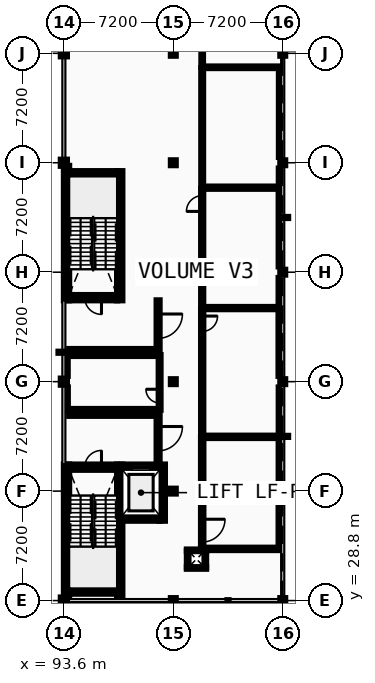
"""IFC4 building model, lengths in metres.
Left out: names, types, materials, properties, quantities, classifications, styles, units other than length and angle.
Written with IfcOpenShell. Run it as: python <this file> out.ifc"""

import sys

from ifc_helpers import new_model, si_unit, direction, frame, frame_2d, origin, origin_2d, place, context, subcontext, project, spatial, rectangle, hollow_circle, extrude, element, fill, save


model = new_model("IFC4")
c1 = context("Model", 3, precision=1e-05, world=origin(), true_north=direction((0.0, 1.0)))
c2 = subcontext(c1, "Body", "Model", "MODEL_VIEW")
j1 = project(units=[si_unit("LENGTHUNIT", "METRE"), si_unit("PLANEANGLEUNIT", "RADIAN")], contexts=[c1])
p1 = place(None, origin())
s1 = spatial("IfcSite", under=j1, at=p1, CompositionType="ELEMENT")
p2 = place(p1, origin())
s2 = spatial("IfcBuilding", under=s1, at=p2, CompositionType="ELEMENT")
p3 = place(p2, frame((0.0, 0.0, 5.2)))
s3 = spatial("IfcBuildingStorey", under=s2, at=p3, CompositionType="ELEMENT", Elevation=5.2)
for number, where, z_axis, x_axis in (
    (1, (93.6, 28.8, 0.0), (0.0, 0.0, 1.0), (1.0, 0.0, 0.0)),
    (2, (93.6, 43.2, 0.0), (0.0, 0.0, 1.0), (1.0, 0.0, 0.0)),
    (3, (93.6, 57.6, 0.0), (0.0, 0.0, 1.0), (1.0, 0.0, 0.0)),
    (4, (93.6, 64.8, 0.0), (0.0, 0.0, 1.0), (1.0, 0.0, 0.0)),
):
    element("IfcColumn", number, at=place(p3, frame(where, z_axis=z_axis, x_axis=x_axis)), inside=s3, PredefinedType="COLUMN", context=c2, shape_type="SweptSolid", body=[
        extrude(hollow_circle(Radius=0.203, WallThickness=0.016, at=origin_2d()), origin(), (0.0, 0.0, 1.0), 4.4),
    ])
for number, where, z_axis, x_axis in (
    (5, (100.8, 28.8, 0.0), (0.0, 0.0, 1.0), (1.0, 0.0, 0.0)),
    (6, (100.8, 36.0, 0.0), (0.0, 0.0, 1.0), (1.0, 0.0, 0.0)),
    (7, (100.8, 43.2, 0.0), (0.0, 0.0, 1.0), (1.0, 0.0, 0.0)),
    (8, (100.8, 50.4, 0.0), (0.0, 0.0, 1.0), (1.0, 0.0, 0.0)),
    (9, (100.8, 57.6, 0.0), (0.0, 0.0, 1.0), (1.0, 0.0, 0.0)),
    (10, (100.8, 64.8, 0.0), (0.0, 0.0, 1.0), (1.0, 0.0, 0.0)),
    (11, (108.0, 28.8, 0.0), (0.0, 0.0, 1.0), (1.0, 0.0, 0.0)),
    (12, (108.0, 36.0, 0.0), (0.0, 0.0, 1.0), (1.0, 0.0, 0.0)),
    (13, (108.0, 43.2, 0.0), (0.0, 0.0, 1.0), (1.0, 0.0, 0.0)),
    (14, (108.0, 50.4, 0.0), (0.0, 0.0, 1.0), (1.0, 0.0, 0.0)),
    (15, (108.0, 57.6, 0.0), (0.0, 0.0, 1.0), (1.0, 0.0, 0.0)),
    (16, (108.0, 64.8, 0.0), (0.0, 0.0, 1.0), (1.0, 0.0, 0.0)),
):
    element("IfcColumn", number, at=place(p3, frame(where, z_axis=z_axis, x_axis=x_axis)), inside=s3, PredefinedType="COLUMN", context=c2, shape_type="SweptSolid", body=[
        extrude(hollow_circle(Radius=0.162, WallThickness=0.012, at=origin_2d()), origin(), (0.0, 0.0, 1.0), 4.4),
    ])
p4 = place(p3, frame((93.95, 29.425, 0.0), z_axis=(0.0, 0.0, 1.0), x_axis=(1.0, 0.0, 0.0)))
e17 = element("IfcWall", 17, at=p4, inside=s3, PredefinedType="SHEAR", context=c2, shape_type="SweptSolid", body=[
    extrude(rectangle(XDim=3.15, YDim=0.35, at=frame_2d((1.575, 0.0))), origin(), (0.0, 0.0, 1.0), 4.185),
])
p5 = place(p3, frame((93.95, 37.575, 0.0), z_axis=(0.0, 0.0, 1.0), x_axis=(1.0, 0.0, 0.0)))
e18 = element("IfcWall", 18, at=p5, inside=s3, PredefinedType="SHEAR", context=c2, shape_type="SweptSolid", body=[
    extrude(rectangle(XDim=3.15, YDim=0.35, at=frame_2d((1.575, 0.0))), origin(), (0.0, 0.0, 1.0), 4.185),
])
p6 = place(p5, frame((1.025, 0.0, 0.0)))
e19 = element("IfcOpeningElement", 19, at=p6, cuts=e18, PredefinedType="OPENING", context=c2, shape_type="SweptSolid", body=[
    extrude(rectangle(XDim=1.1, YDim=2.15, at=frame_2d((0.55, 1.075))), frame((0.0, 0.185, 0.0), z_axis=(0.0, -1.0, 0.0), x_axis=(1.0, 0.0, 0.0)), (0.0, 0.0, 1.0), 0.37),
])
for number, where, z_axis, x_axis in (
    (20, (93.775, 29.0, 0.0), (0.0, 0.0, 1.0), (0.0, 1.0, 0.0)),
    (21, (97.275, 29.0, 0.0), (0.0, 0.0, 1.0), (0.0, 1.0, 0.0)),
):
    element("IfcWall", number, at=place(p3, frame(where, z_axis=z_axis, x_axis=x_axis)), inside=s3, PredefinedType="SHEAR", context=c2, shape_type="SweptSolid", body=[
        extrude(rectangle(XDim=8.75, YDim=0.35, at=frame_2d((4.375, 0.0))), origin(), (0.0, 0.0, 1.0), 4.185),
    ])
p7 = place(p3, frame((97.45, 34.225, 0.0), z_axis=(0.0, 0.0, 1.0), x_axis=(1.0, 0.0, 0.0)))
e22 = element("IfcWall", 22, at=p7, inside=s3, PredefinedType="SHEAR", context=c2, shape_type="SweptSolid", body=[
    extrude(rectangle(XDim=2.45, YDim=0.35, at=frame_2d((1.225, 0.0))), origin(), (0.0, 0.0, 1.0), 4.185),
])
p8 = place(p3, frame((97.45, 37.575, 0.0), z_axis=(0.0, 0.0, 1.0), x_axis=(1.0, 0.0, 0.0)))
e23 = element("IfcWall", 23, at=p8, inside=s3, PredefinedType="SHEAR", context=c2, shape_type="SweptSolid", body=[
    extrude(rectangle(XDim=2.45, YDim=0.35, at=frame_2d((1.225, 0.0))), origin(), (0.0, 0.0, 1.0), 4.185),
])
p9 = place(p8, frame((0.625, 0.0, 0.0)))
e24 = element("IfcOpeningElement", 24, at=p9, cuts=e23, PredefinedType="OPENING", context=c2, shape_type="SweptSolid", body=[
    extrude(rectangle(XDim=1.2, YDim=2.2, at=frame_2d((0.6, 1.1))), frame((0.0, 0.185, 0.0), z_axis=(0.0, -1.0, 0.0), x_axis=(1.0, 0.0, 0.0)), (0.0, 0.0, 1.0), 0.37),
])
p10 = place(p3, frame((100.075, 34.05, 0.0), z_axis=(0.0, 0.0, 1.0), x_axis=(0.0, 1.0, 0.0)))
e25 = element("IfcWall", 25, at=p10, inside=s3, PredefinedType="SHEAR", context=c2, shape_type="SweptSolid", body=[
    extrude(rectangle(XDim=3.7, YDim=0.35, at=frame_2d((1.85, 0.0))), origin(), (0.0, 0.0, 1.0), 4.185),
])
p11 = place(p3, frame((99.8, 37.75, 0.0), z_axis=(0.0, 0.0, 1.0), x_axis=(0.0, 1.0, 0.0)))
e26 = element("IfcWall", 26, at=p11, inside=s3, PredefinedType="PARTITIONING", context=c2, shape_type="SweptSolid", body=[
    extrude(rectangle(XDim=3.4, YDim=0.2, at=frame_2d((1.7, 0.0))), origin(), (0.0, 0.0, 1.0), 4.185),
])
p12 = place(p11, frame((0.9, 0.0, 0.0)))
e27 = element("IfcOpeningElement", 27, at=p12, cuts=e26, PredefinedType="OPENING", context=c2, shape_type="SweptSolid", body=[
    extrude(rectangle(XDim=1.6, YDim=2.2, at=frame_2d((0.8, 1.1))), frame((0.0, 0.11, 0.0), z_axis=(0.0, -1.0, 0.0), x_axis=(1.0, 0.0, 0.0)), (0.0, 0.0, 1.0), 0.22),
])
p13 = place(p3, frame((93.95, 41.05, 0.0), z_axis=(0.0, 0.0, 1.0), x_axis=(1.0, 0.0, 0.0)))
e28 = element("IfcWall", 28, at=p13, inside=s3, PredefinedType="PARTITIONING", context=c2, shape_type="SweptSolid", body=[
    extrude(rectangle(XDim=5.75, YDim=0.2, at=frame_2d((2.875, 0.0))), origin(), (0.0, 0.0, 1.0), 4.185),
])
p14 = place(p3, frame((93.95, 48.725, 0.0), z_axis=(0.0, 0.0, 1.0), x_axis=(1.0, 0.0, 0.0)))
e29 = element("IfcWall", 29, at=p14, inside=s3, PredefinedType="SHEAR", context=c2, shape_type="SweptSolid", body=[
    extrude(rectangle(XDim=3.15, YDim=0.35, at=frame_2d((1.575, 0.0))), origin(), (0.0, 0.0, 1.0), 4.185),
])
p15 = place(p14, frame((1.025, 0.0, 0.0)))
e30 = element("IfcOpeningElement", 30, at=p15, cuts=e29, PredefinedType="OPENING", context=c2, shape_type="SweptSolid", body=[
    extrude(rectangle(XDim=1.1, YDim=2.15, at=frame_2d((0.55, 1.075))), frame((0.0, 0.185, 0.0), z_axis=(0.0, -1.0, 0.0), x_axis=(1.0, 0.0, 0.0)), (0.0, 0.0, 1.0), 0.37),
])
p16 = place(p3, frame((93.95, 56.875, 0.0), z_axis=(0.0, 0.0, 1.0), x_axis=(1.0, 0.0, 0.0)))
e31 = element("IfcWall", 31, at=p16, inside=s3, PredefinedType="SHEAR", context=c2, shape_type="SweptSolid", body=[
    extrude(rectangle(XDim=3.15, YDim=0.35, at=frame_2d((1.575, 0.0))), origin(), (0.0, 0.0, 1.0), 4.185),
])
p17 = place(p3, frame((93.775, 48.55, 0.0), z_axis=(0.0, 0.0, 1.0), x_axis=(0.0, 1.0, 0.0)))
e32 = element("IfcWall", 32, at=p17, inside=s3, PredefinedType="SHEAR", context=c2, shape_type="SweptSolid", body=[
    extrude(rectangle(XDim=8.847, YDim=0.35, at=frame_2d((4.423, 0.0))), origin(), (0.0, 0.0, 1.0), 4.185),
])
p18 = place(p3, frame((97.275, 48.55, 0.0), z_axis=(0.0, 0.0, 1.0), x_axis=(0.0, 1.0, 0.0)))
e33 = element("IfcWall", 33, at=p18, inside=s3, PredefinedType="SHEAR", context=c2, shape_type="SweptSolid", body=[
    extrude(rectangle(XDim=8.5, YDim=0.35, at=frame_2d((4.25, 0.0))), origin(), (0.0, 0.0, 1.0), 4.185),
])
p19 = place(p3, frame((99.8, 45.15, 0.0), z_axis=(0.0, 0.0, 1.0), x_axis=(0.0, 1.0, 0.0)))
e34 = element("IfcWall", 34, at=p19, inside=s3, PredefinedType="PARTITIONING", context=c2, shape_type="SweptSolid", body=[
    extrude(rectangle(XDim=3.4, YDim=0.2, at=frame_2d((1.7, 0.0))), origin(), (0.0, 0.0, 1.0), 4.185),
])
p20 = place(p19, frame((0.9, 0.0, 0.0)))
e35 = element("IfcOpeningElement", 35, at=p20, cuts=e34, PredefinedType="OPENING", context=c2, shape_type="SweptSolid", body=[
    extrude(rectangle(XDim=1.6, YDim=2.2, at=frame_2d((0.8, 1.1))), frame((0.0, 0.11, 0.0), z_axis=(0.0, -1.0, 0.0), x_axis=(1.0, 0.0, 0.0)), (0.0, 0.0, 1.0), 0.22),
])
p21 = place(p3, frame((93.95, 45.25, 0.0), z_axis=(0.0, 0.0, 1.0), x_axis=(1.0, 0.0, 0.0)))
e36 = element("IfcWall", 36, at=p21, inside=s3, PredefinedType="PARTITIONING", context=c2, shape_type="SweptSolid", body=[
    extrude(rectangle(XDim=5.75, YDim=0.2, at=frame_2d((2.875, 0.0))), origin(), (0.0, 0.0, 1.0), 4.185),
])
for number, where, z_axis, x_axis in (
    (37, (101.69, 30.945, 0.0), (0.0, 0.0, 1.0), (1.0, 0.0, 0.0)),
    (38, (101.69, 32.105, 0.0), (0.0, 0.0, 1.0), (1.0, 0.0, 0.0)),
):
    element("IfcWall", number, at=place(p3, frame(where, z_axis=z_axis, x_axis=x_axis)), inside=s3, PredefinedType="PARTITIONING", context=c2, shape_type="SweptSolid", body=[
        extrude(rectangle(XDim=1.27, YDim=0.11, at=frame_2d((0.635, 0.0))), origin(), (0.0, 0.0, 1.0), 4.185),
    ])
for number, where, z_axis, x_axis in (
    (39, (101.745, 31.0, 0.0), (0.0, 0.0, 1.0), (0.0, 1.0, 0.0)),
    (40, (102.905, 31.0, 0.0), (0.0, 0.0, 1.0), (0.0, 1.0, 0.0)),
):
    element("IfcWall", number, at=place(p3, frame(where, z_axis=z_axis, x_axis=x_axis)), inside=s3, PredefinedType="PARTITIONING", context=c2, shape_type="SweptSolid", body=[
        extrude(rectangle(XDim=1.05, YDim=0.11, at=frame_2d((0.525, 0.0))), origin(), (0.0, 0.0, 1.0), 4.185),
    ])
p22 = place(p3, frame((103.035, 32.2, 0.0), z_axis=(0.0, 0.0, 1.0), x_axis=(1.0, 0.0, 0.0)))
e41 = element("IfcWall", 41, at=p22, inside=s3, PredefinedType="PARTITIONING", context=c2, shape_type="SweptSolid", body=[
    extrude(rectangle(XDim=4.765, YDim=0.16, at=frame_2d((2.383, 0.0))), origin(), (0.0, 0.0, 1.0), 4.185),
])
p23 = place(p3, frame((102.7, 39.57, 0.0), z_axis=(0.0, 0.0, 1.0), x_axis=(1.0, 0.0, 0.0)))
e42 = element("IfcWall", 42, at=p23, inside=s3, PredefinedType="PARTITIONING", context=c2, shape_type="SweptSolid", body=[
    extrude(rectangle(XDim=5.1, YDim=0.16, at=frame_2d((2.55, 0.0))), origin(), (0.0, 0.0, 1.0), 4.185),
])
p24 = place(p3, frame((93.8, 41.35, 0.0), z_axis=(0.0, 0.0, 1.0), x_axis=(1.0, 0.0, 0.0)))
e43 = element("IfcWall", 43, at=p24, inside=s3, PredefinedType="PARTITIONING", context=c2, shape_type="SweptSolid", body=[
    extrude(rectangle(XDim=5.88, YDim=0.11, at=frame_2d((2.94, 0.0))), origin(), (0.0, 0.0, 1.0), 4.185),
])
p25 = place(p3, frame((93.8, 44.95, 0.0), z_axis=(0.0, 0.0, 1.0), x_axis=(1.0, 0.0, 0.0)))
e44 = element("IfcWall", 44, at=p25, inside=s3, PredefinedType="PARTITIONING", context=c2, shape_type="SweptSolid", body=[
    extrude(rectangle(XDim=5.88, YDim=0.125, at=frame_2d((2.94, 0.0))), origin(), (0.0, 0.0, 1.0), 4.185),
])
for number, where, z_axis, x_axis in (
    (45, (102.7, 48.04, 0.0), (0.0, 0.0, 1.0), (1.0, 0.0, 0.0)),
    (46, (102.7, 55.96, 0.0), (0.0, 0.0, 1.0), (1.0, 0.0, 0.0)),
):
    element("IfcWall", number, at=place(p3, frame(where, z_axis=z_axis, x_axis=x_axis)), inside=s3, PredefinedType="PARTITIONING", context=c2, shape_type="SweptSolid", body=[
        extrude(rectangle(XDim=5.1, YDim=0.15, at=frame_2d((2.55, 0.0))), origin(), (0.0, 0.0, 1.0), 4.185),
    ])
p26 = place(p3, frame((102.7, 63.88, 0.0), z_axis=(0.0, 0.0, 1.0), x_axis=(1.0, 0.0, 0.0)))
e47 = element("IfcWall", 47, at=p26, inside=s3, PredefinedType="PARTITIONING", context=c2, shape_type="SweptSolid", body=[
    extrude(rectangle(XDim=5.1, YDim=0.11, at=frame_2d((2.55, 0.0))), origin(), (0.0, 0.0, 1.0), 4.185),
])
p27 = place(p3, frame((93.8, 41.405, 0.0), z_axis=(0.0, 0.0, 1.0), x_axis=(0.0, 1.0, 0.0)))
e48 = element("IfcWall", 48, at=p27, inside=s3, PredefinedType="PARTITIONING", context=c2, shape_type="SweptSolid", body=[
    extrude(rectangle(XDim=1.415, YDim=0.125, at=frame_2d((0.708, 0.0))), origin(), (0.0, 0.0, 1.0), 4.185),
])
p28 = place(p3, frame((93.8, 43.58, 0.0), z_axis=(0.0, 0.0, 1.0), x_axis=(0.0, 1.0, 0.0)))
e49 = element("IfcWall", 49, at=p28, inside=s3, PredefinedType="PARTITIONING", context=c2, shape_type="SweptSolid", body=[
    extrude(rectangle(XDim=1.307, YDim=0.11, at=frame_2d((0.654, 0.0))), origin(), (0.0, 0.0, 1.0), 4.185),
])
p29 = place(p3, frame((99.9, 41.35, 0.0), z_axis=(0.0, 0.0, 1.0), x_axis=(0.0, 1.0, 0.0)))
e50 = element("IfcWall", 50, at=p29, inside=s3, PredefinedType="PARTITIONING", context=c2, shape_type="SweptSolid", body=[
    extrude(rectangle(XDim=3.6, YDim=0.125, at=frame_2d((1.8, 0.0))), origin(), (0.0, 0.0, 1.0), 4.185),
])
p30 = place(p29, frame((0.45, 0.0, 0.0)))
e51 = element("IfcOpeningElement", 51, at=p30, cuts=e50, PredefinedType="OPENING", context=c2, shape_type="SweptSolid", body=[
    extrude(rectangle(XDim=0.9, YDim=2.1, at=frame_2d((0.45, 1.05))), frame((0.0, 0.073, 0.0), z_axis=(0.0, -1.0, 0.0), x_axis=(1.0, 0.0, 0.0)), (0.0, 0.0, 1.0), 0.145),
])
p31 = place(p3, frame((102.7, 32.2, 0.0), z_axis=(0.0, 0.0, 1.0), x_axis=(0.0, 1.0, 0.0)))
e52 = element("IfcWall", 52, at=p31, inside=s3, PredefinedType="PARTITIONING", context=c2, shape_type="SweptSolid", body=[
    extrude(rectangle(XDim=7.29, YDim=0.16, at=frame_2d((3.645, 0.0))), origin(), (0.0, 0.0, 1.0), 4.185),
])
p32 = place(p31, frame((0.45, 0.0, 0.0)))
e53 = element("IfcOpeningElement", 53, at=p32, cuts=e52, PredefinedType="OPENING", context=c2, shape_type="SweptSolid", body=[
    extrude(rectangle(XDim=1.5, YDim=2.2, at=frame_2d((0.75, 1.1))), frame((0.0, 0.09, 0.0), z_axis=(0.0, -1.0, 0.0), x_axis=(1.0, 0.0, 0.0)), (0.0, 0.0, 1.0), 0.18),
])
p33 = place(p3, frame((102.7, 39.65, 0.0), z_axis=(0.0, 0.0, 1.0), x_axis=(0.0, 1.0, 0.0)))
e54 = element("IfcWall", 54, at=p33, inside=s3, PredefinedType="PARTITIONING", context=c2, shape_type="SweptSolid", body=[
    extrude(rectangle(XDim=8.315, YDim=0.15, at=frame_2d((4.158, 0.0))), origin(), (0.0, 0.0, 1.0), 4.185),
])
p34 = place(p33, frame((6.855, 0.0, 0.0)))
e55 = element("IfcOpeningElement", 55, at=p34, cuts=e54, PredefinedType="OPENING", context=c2, shape_type="SweptSolid", body=[
    extrude(rectangle(XDim=1.01, YDim=2.124, at=frame_2d((0.505, 1.062))), frame((0.0, 0.085, 0.0), z_axis=(0.0, -1.0, 0.0), x_axis=(1.0, 0.0, 0.0)), (0.0, 0.0, 1.0), 0.17),
])
p35 = place(p3, frame((102.7, 48.115, 0.0), z_axis=(0.0, 0.0, 1.0), x_axis=(0.0, 1.0, 0.0)))
e56 = element("IfcWall", 56, at=p35, inside=s3, PredefinedType="PARTITIONING", context=c2, shape_type="SweptSolid", body=[
    extrude(rectangle(XDim=7.77, YDim=0.142, at=frame_2d((3.885, 0.0))), origin(), (0.0, 0.0, 1.0), 4.185),
])
p36 = place(p35, frame((6.284, 0.0, 0.0)))
e57 = element("IfcOpeningElement", 57, at=p36, cuts=e56, PredefinedType="OPENING", context=c2, shape_type="SweptSolid", body=[
    extrude(rectangle(XDim=1.036, YDim=2.124, at=frame_2d((0.518, 1.062))), frame((0.0, 0.081, 0.0), z_axis=(0.0, -1.0, 0.0), x_axis=(1.0, 0.0, 0.0)), (0.0, 0.0, 1.0), 0.162),
])
p37 = place(p3, frame((102.7, 56.035, 0.0), z_axis=(0.0, 0.0, 1.0), x_axis=(0.0, 1.0, 0.0)))
e58 = element("IfcWall", 58, at=p37, inside=s3, PredefinedType="PARTITIONING", context=c2, shape_type="SweptSolid", body=[
    extrude(rectangle(XDim=7.79, YDim=0.125, at=frame_2d((3.895, 0.0))), origin(), (0.0, 0.0, 1.0), 4.185),
])
p38 = place(p37, frame((3.395, 0.0, 0.0)))
e59 = element("IfcOpeningElement", 59, at=p38, cuts=e58, PredefinedType="OPENING", context=c2, shape_type="SweptSolid", body=[
    extrude(rectangle(XDim=1.0, YDim=2.1, at=frame_2d((0.5, 1.05))), frame((0.0, 0.073, 0.0), z_axis=(0.0, -1.0, 0.0), x_axis=(1.0, 0.0, 0.0)), (0.0, 0.0, 1.0), 0.145),
])
p39 = place(p3, frame((102.7, 63.935, 0.0), z_axis=(0.0, 0.0, 1.0), x_axis=(0.0, 1.0, 0.0)))
e60 = element("IfcWall", 60, at=p39, inside=s3, PredefinedType="PARTITIONING", context=c2, shape_type="SweptSolid", body=[
    extrude(rectangle(XDim=7.802, YDim=0.11, at=frame_2d((3.901, 0.0))), origin(), (0.0, 0.0, 1.0), 4.185),
])
p40 = place(p39, frame((3.451, 0.0, 0.0)))
e61 = element("IfcOpeningElement", 61, at=p40, cuts=e60, PredefinedType="OPENING", context=c2, shape_type="SweptSolid", body=[
    extrude(rectangle(XDim=0.9, YDim=2.1, at=frame_2d((0.45, 1.05))), frame((0.0, 0.065, 0.0), z_axis=(0.0, -1.0, 0.0), x_axis=(1.0, 0.0, 0.0)), (0.0, 0.0, 1.0), 0.13),
])
p41 = place(p3, frame((107.8, 32.28, 0.0), z_axis=(0.0, 0.0, 1.0), x_axis=(0.0, 1.0, 0.0)))
e62 = element("IfcWall", 62, at=p41, inside=s3, PredefinedType="PARTITIONING", context=c2, shape_type="SweptSolid", body=[
    extrude(rectangle(XDim=3.34, YDim=0.15, at=frame_2d((1.67, 0.0))), origin(), (0.0, 0.0, 1.0), 3.81),
])
p42 = place(p3, frame((107.8, 36.38, 0.0), z_axis=(0.0, 0.0, 1.0), x_axis=(0.0, 1.0, 0.0)))
e63 = element("IfcWall", 63, at=p42, inside=s3, PredefinedType="PARTITIONING", context=c2, shape_type="SweptSolid", body=[
    extrude(rectangle(XDim=3.11, YDim=0.142, at=frame_2d((1.555, 0.0))), origin(), (0.0, 0.0, 1.0), 3.81),
])
p43 = place(p3, frame((107.8, 39.65, 0.0), z_axis=(0.0, 0.0, 1.0), x_axis=(0.0, 1.0, 0.0)))
e64 = element("IfcWall", 64, at=p43, inside=s3, PredefinedType="PARTITIONING", context=c2, shape_type="SweptSolid", body=[
    extrude(rectangle(XDim=3.17, YDim=0.135, at=frame_2d((1.585, 0.0))), origin(), (0.0, 0.0, 1.0), 3.81),
])
p44 = place(p3, frame((107.8, 43.58, 0.0), z_axis=(0.0, 0.0, 1.0), x_axis=(0.0, 1.0, 0.0)))
e65 = element("IfcWall", 65, at=p44, inside=s3, PredefinedType="PARTITIONING", context=c2, shape_type="SweptSolid", body=[
    extrude(rectangle(XDim=4.385, YDim=0.16, at=frame_2d((2.192, 0.0))), origin(), (0.0, 0.0, 1.0), 3.81),
])
p45 = place(p3, frame((107.8, 48.115, 0.0), z_axis=(0.0, 0.0, 1.0), x_axis=(0.0, 1.0, 0.0)))
e66 = element("IfcWall", 66, at=p45, inside=s3, PredefinedType="PARTITIONING", context=c2, shape_type="SweptSolid", body=[
    extrude(rectangle(XDim=1.905, YDim=0.15, at=frame_2d((0.953, 0.0))), origin(), (0.0, 0.0, 1.0), 3.81),
])
p46 = place(p3, frame((107.8, 50.78, 0.0), z_axis=(0.0, 0.0, 1.0), x_axis=(0.0, 1.0, 0.0)))
e67 = element("IfcWall", 67, at=p46, inside=s3, PredefinedType="PARTITIONING", context=c2, shape_type="SweptSolid", body=[
    extrude(rectangle(XDim=5.105, YDim=0.142, at=frame_2d((2.552, 0.0))), origin(), (0.0, 0.0, 1.0), 3.81),
])
p47 = place(p3, frame((107.8, 56.035, 0.0), z_axis=(0.0, 0.0, 1.0), x_axis=(0.0, 1.0, 0.0)))
e68 = element("IfcWall", 68, at=p47, inside=s3, PredefinedType="PARTITIONING", context=c2, shape_type="SweptSolid", body=[
    extrude(rectangle(XDim=1.185, YDim=0.125, at=frame_2d((0.593, 0.0))), origin(), (0.0, 0.0, 1.0), 3.81),
])
p48 = place(p3, frame((107.8, 57.98, 0.0), z_axis=(0.0, 0.0, 1.0), x_axis=(0.0, 1.0, 0.0)))
e69 = element("IfcWall", 69, at=p48, inside=s3, PredefinedType="PARTITIONING", context=c2, shape_type="SweptSolid", body=[
    extrude(rectangle(XDim=5.845, YDim=0.11, at=frame_2d((2.922, 0.0))), origin(), (0.0, 0.0, 1.0), 4.185),
])
p49 = place(p6, frame((1.1, 0.0, 0.0), z_axis=(0.0, 0.0, 1.0), x_axis=(-1.0, 0.0, 0.0)))
e70 = element("IfcDoor", 70, at=p49, inside=s3, OperationType="SINGLE_SWING_RIGHT", PredefinedType="DOOR", context=c2, shape_type="SweptSolid", body=[
    extrude(rectangle(XDim=1.1, YDim=2.15, at=frame_2d((0.55, 1.075))), frame((0.0, 0.025, 0.0), z_axis=(0.0, -1.0, 0.0), x_axis=(1.0, 0.0, 0.0)), (0.0, 0.0, 1.0), 0.05),
])
fill(e19, e70)
p50 = place(p9, origin())
e71 = element("IfcDoor", 71, at=p50, inside=s3, OperationType="SLIDING_TO_RIGHT", PredefinedType="DOOR", context=c2, shape_type="SweptSolid", body=[
    extrude(rectangle(XDim=1.2, YDim=2.2, at=frame_2d((0.6, 1.1))), frame((0.0, 0.025, 0.0), z_axis=(0.0, -1.0, 0.0), x_axis=(1.0, 0.0, 0.0)), (0.0, 0.0, 1.0), 0.05),
])
fill(e24, e71)
p51 = place(p12, origin())
e72 = element("IfcDoor", 72, at=p51, inside=s3, OperationType="DOUBLE_DOOR_SINGLE_SWING", PredefinedType="DOOR", context=c2, shape_type="SweptSolid", body=[
    extrude(rectangle(XDim=1.6, YDim=2.2, at=frame_2d((0.8, 1.1))), frame((0.0, 0.025, 0.0), z_axis=(0.0, -1.0, 0.0), x_axis=(1.0, 0.0, 0.0)), (0.0, 0.0, 1.0), 0.05),
])
fill(e27, e72)
p52 = place(p15, origin())
e73 = element("IfcDoor", 73, at=p52, inside=s3, OperationType="SINGLE_SWING_RIGHT", PredefinedType="DOOR", context=c2, shape_type="SweptSolid", body=[
    extrude(rectangle(XDim=1.1, YDim=2.15, at=frame_2d((0.55, 1.075))), frame((0.0, 0.025, 0.0), z_axis=(0.0, -1.0, 0.0), x_axis=(1.0, 0.0, 0.0)), (0.0, 0.0, 1.0), 0.05),
])
fill(e30, e73)
p53 = place(p20, origin())
e74 = element("IfcDoor", 74, at=p53, inside=s3, OperationType="DOUBLE_DOOR_SINGLE_SWING", PredefinedType="DOOR", context=c2, shape_type="SweptSolid", body=[
    extrude(rectangle(XDim=1.6, YDim=2.2, at=frame_2d((0.8, 1.1))), frame((0.0, 0.025, 0.0), z_axis=(0.0, -1.0, 0.0), x_axis=(1.0, 0.0, 0.0)), (0.0, 0.0, 1.0), 0.05),
])
fill(e35, e74)
p54 = place(p32, origin())
e75 = element("IfcDoor", 75, at=p54, inside=s3, OperationType="DOUBLE_DOOR_SINGLE_SWING", PredefinedType="DOOR", context=c2, shape_type="SweptSolid", body=[
    extrude(rectangle(XDim=1.5, YDim=2.2, at=frame_2d((0.75, 1.1))), frame((0.0, 0.025, 0.0), z_axis=(0.0, -1.0, 0.0), x_axis=(1.0, 0.0, 0.0)), (0.0, 0.0, 1.0), 0.05),
])
fill(e53, e75)
p55 = place(p34, origin())
e76 = element("IfcDoor", 76, at=p55, inside=s3, OperationType="SINGLE_SWING_RIGHT", PredefinedType="DOOR", context=c2, shape_type="SweptSolid", body=[
    extrude(rectangle(XDim=1.01, YDim=2.124, at=frame_2d((0.505, 1.062))), frame((0.0, 0.025, 0.0), z_axis=(0.0, -1.0, 0.0), x_axis=(1.0, 0.0, 0.0)), (0.0, 0.0, 1.0), 0.05),
])
fill(e55, e76)
p56 = place(p36, origin())
e77 = element("IfcDoor", 77, at=p56, inside=s3, OperationType="SINGLE_SWING_LEFT", PredefinedType="DOOR", context=c2, shape_type="SweptSolid", body=[
    extrude(rectangle(XDim=1.036, YDim=2.124, at=frame_2d((0.518, 1.062))), frame((0.0, 0.025, 0.0), z_axis=(0.0, -1.0, 0.0), x_axis=(1.0, 0.0, 0.0)), (0.0, 0.0, 1.0), 0.05),
])
fill(e57, e77)
p57 = place(p38, origin())
e78 = element("IfcDoor", 78, at=p57, inside=s3, OperationType="SLIDING_TO_LEFT", PredefinedType="DOOR", context=c2, shape_type="SweptSolid", body=[
    extrude(rectangle(XDim=1.0, YDim=2.1, at=frame_2d((0.5, 1.05))), frame((0.0, 0.025, 0.0), z_axis=(0.0, -1.0, 0.0), x_axis=(1.0, 0.0, 0.0)), (0.0, 0.0, 1.0), 0.05),
])
fill(e59, e78)
p58 = place(p30, frame((0.9, 0.0, 0.0), z_axis=(0.0, 0.0, 1.0), x_axis=(-1.0, 0.0, 0.0)))
e79 = element("IfcDoor", 79, at=p58, inside=s3, OperationType="SINGLE_SWING_RIGHT", PredefinedType="DOOR", context=c2, shape_type="SweptSolid", body=[
    extrude(rectangle(XDim=0.9, YDim=2.1, at=frame_2d((0.45, 1.05))), frame((0.0, 0.025, 0.0), z_axis=(0.0, -1.0, 0.0), x_axis=(1.0, 0.0, 0.0)), (0.0, 0.0, 1.0), 0.05),
])
fill(e51, e79)
save(model, sys.argv[1])
